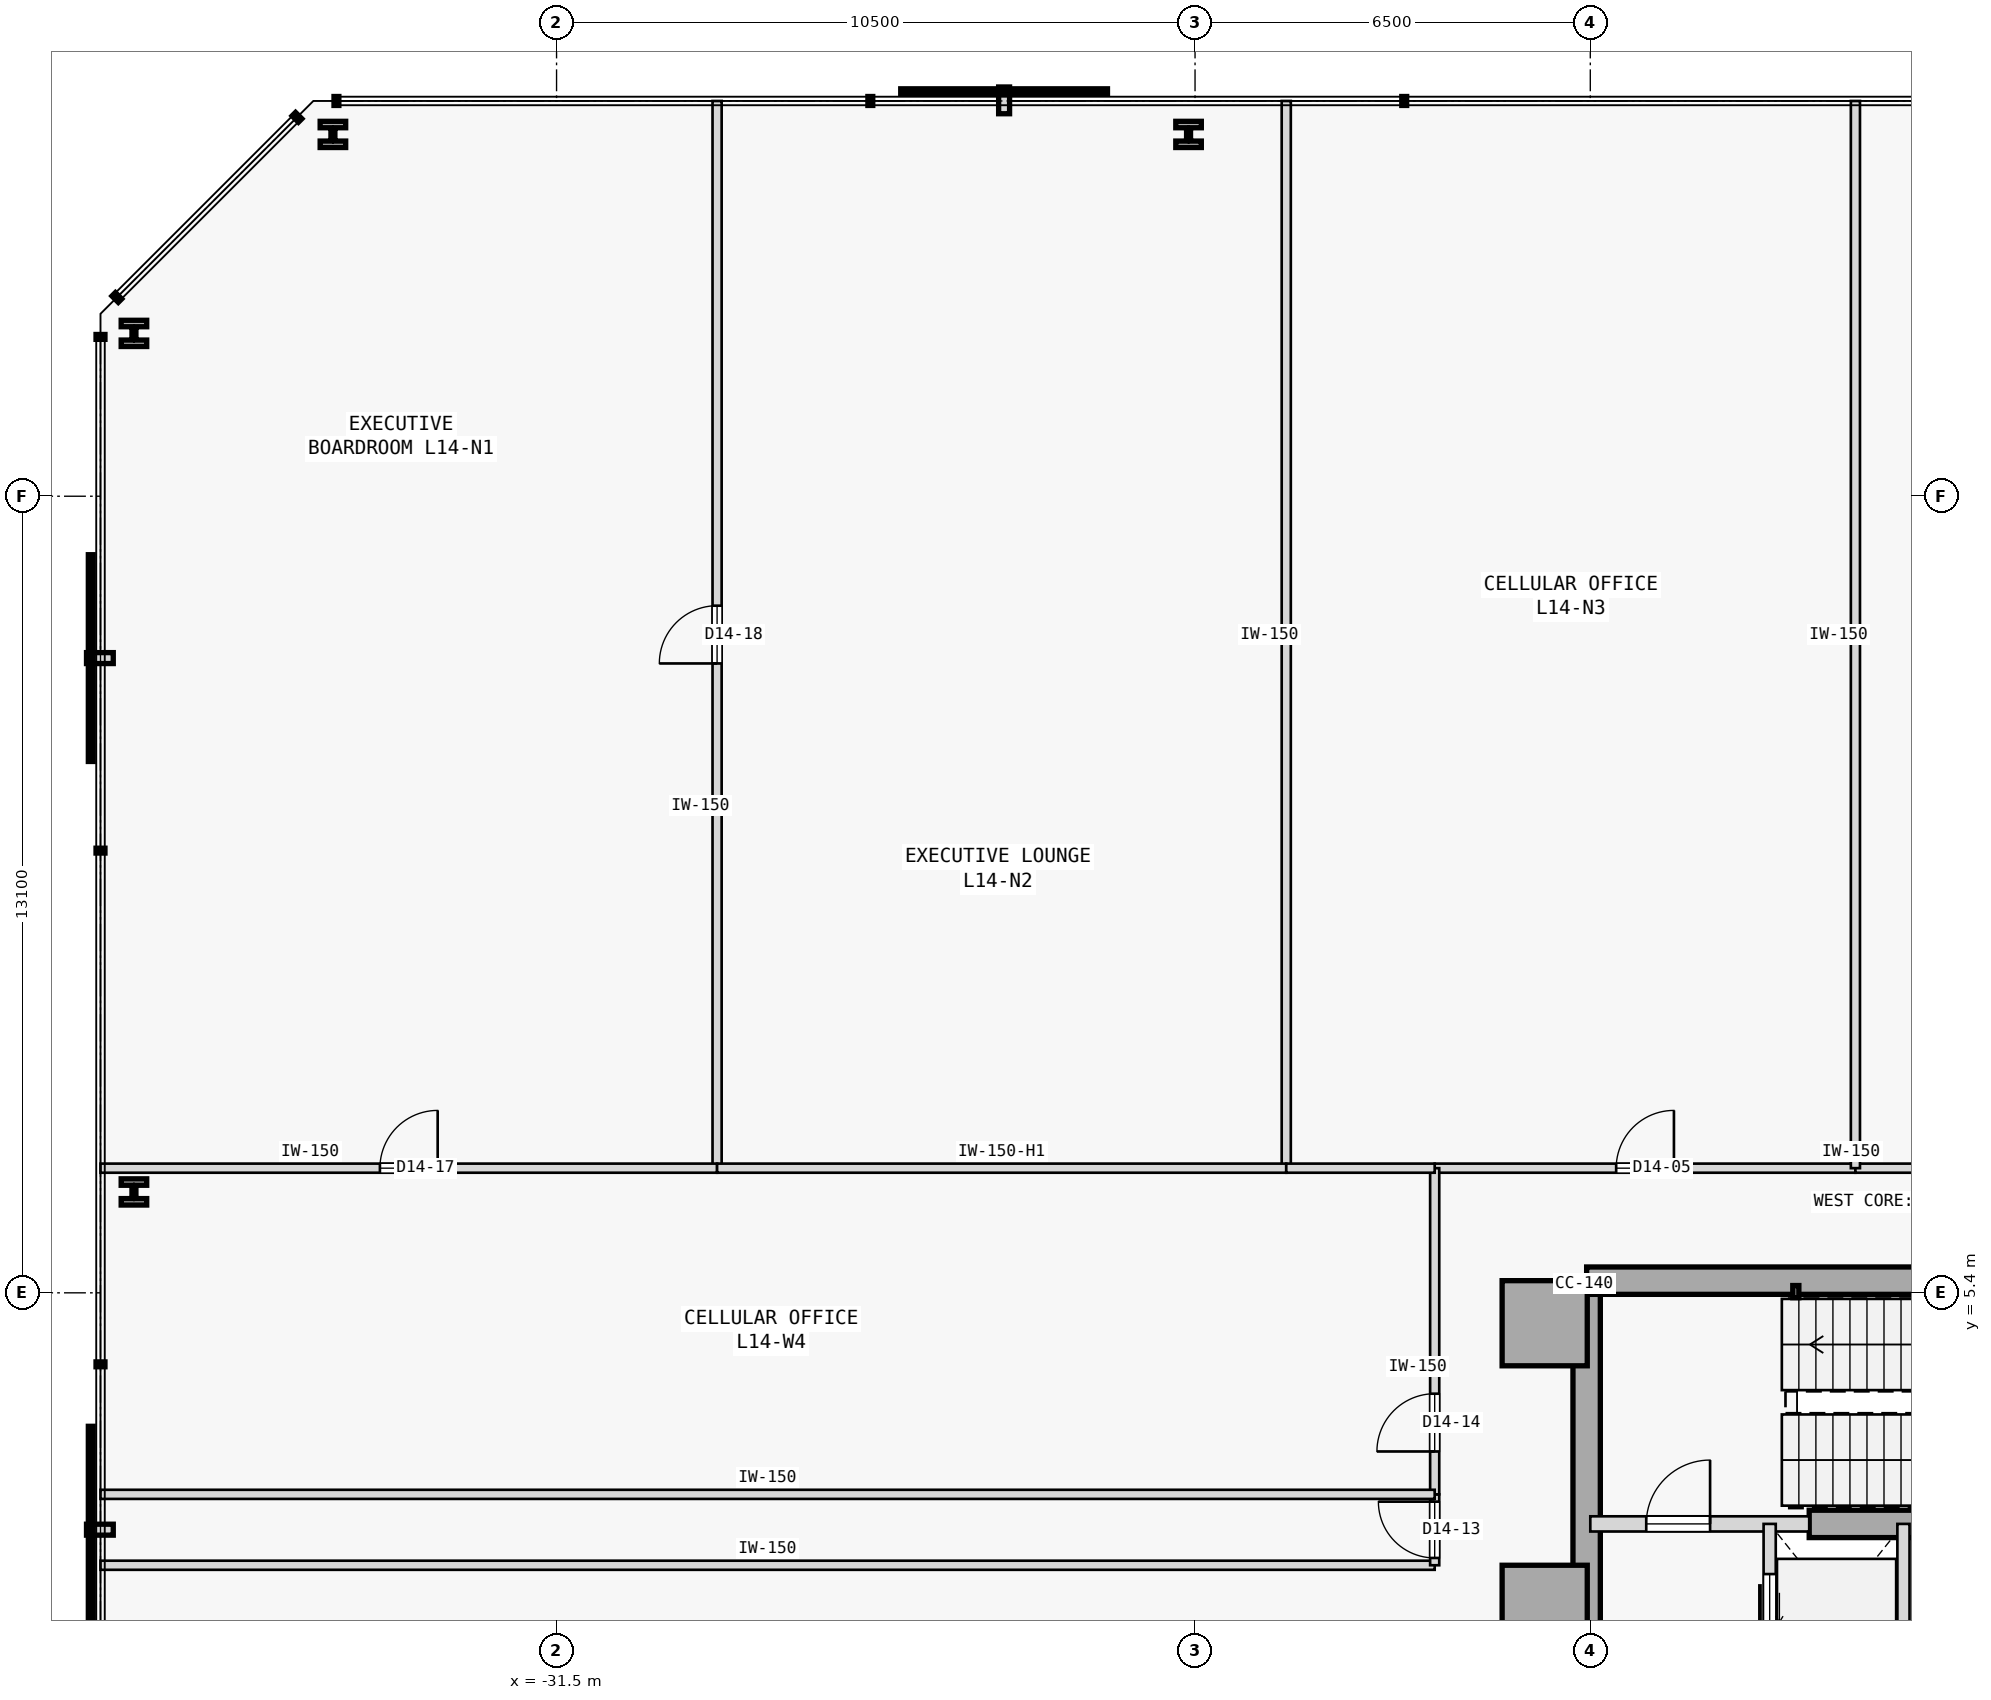
"""IFC4 building model, lengths in metres.
Left out: names, types, materials, properties, quantities, classifications, styles, units other than length and angle.
Written with IfcOpenShell. Run it as: python <this file> out.ifc"""

import sys

from ifc_helpers import new_model, si_unit, direction, frame, frame_2d, origin, origin_2d, place, context, subcontext, project, spatial, rectangle, hollow_rectangle, i_section, extrude, element, fill, save


model = new_model("IFC4")
c1 = context("Model", 3, precision=1e-05, world=origin(), true_north=direction((0.0, 1.0)))
c2 = subcontext(c1, "Body", "Model", "MODEL_VIEW")
j1 = project(units=[si_unit("LENGTHUNIT", "METRE"), si_unit("PLANEANGLEUNIT", "RADIAN")], contexts=[c1])
p1 = place(None, origin())
s1 = spatial("IfcSite", under=j1, at=p1, CompositionType="ELEMENT")
p2 = place(p1, origin())
s2 = spatial("IfcBuilding", under=s1, at=p2, CompositionType="ELEMENT")
p3 = place(p2, frame((0.0, 0.0, 59.8)))
s3 = spatial("IfcBuildingStorey", under=s2, at=p3, CompositionType="ELEMENT", Elevation=59.8)
for number, where, z_axis, x_axis in (
    (1, (-15.25, 4.9, 0.0), (0.0, 0.0, 1.0), (1.0, 0.0, 0.0)),
    (2, (-15.25, 0.22, 0.0), (0.0, 0.0, 1.0), (1.0, 0.0, 0.0)),
):
    element("IfcColumn", number, at=place(p3, frame(where, z_axis=z_axis, x_axis=x_axis)), inside=s3, PredefinedType="COLUMN", context=c2, shape_type="SweptSolid", body=[
        extrude(rectangle(XDim=1.4, YDim=1.4, at=origin_2d()), origin(), (0.0, 0.0, 1.0), 3.8),
    ])
p4 = place(p3, frame((-14.56, 5.6, 0.0), z_axis=(0.0, 0.0, 1.0), x_axis=(1.0, 0.0, 0.0)))
e3 = element("IfcWall", 3, at=p4, inside=s3, PredefinedType="SHEAR", context=c2, shape_type="SweptSolid", body=[
    extrude(rectangle(XDim=11.41, YDim=0.45, at=frame_2d((5.705, 0.0))), origin(), (0.0, 0.0, 1.0), 3.575),
])
p5 = place(p3, frame((-14.56, -5.375, 0.0), z_axis=(0.0, 0.0, 1.0), x_axis=(0.0, 1.0, 0.0)))
e4 = element("IfcWall", 4, at=p5, inside=s3, PredefinedType="SHEAR", context=c2, shape_type="SweptSolid", body=[
    extrude(rectangle(XDim=10.75, YDim=0.45, at=frame_2d((5.375, 0.0))), origin(), (0.0, 0.0, 1.0), 3.575),
])
p6 = place(p3, frame((-10.9, 1.6, 0.0), z_axis=(0.0, 0.0, 1.0), x_axis=(1.0, 0.0, 0.0)))
e5 = element("IfcWall", 5, at=p6, inside=s3, PredefinedType="SHEAR", context=c2, shape_type="SweptSolid", body=[
    extrude(rectangle(XDim=5.15, YDim=0.45, at=frame_2d((2.575, 0.0))), origin(), (0.0, 0.0, 1.0), 3.575),
])
p7 = place(p3, frame((-11.12, 5.42, 0.0), z_axis=(0.0, 0.0, 1.0), x_axis=(1.0, 0.0, 0.0)))
e6 = element("IfcColumn", 6, at=p7, inside=s3, PredefinedType="COLUMN", context=c2, shape_type="SweptSolid", body=[
    extrude(hollow_rectangle(XDim=0.1, YDim=0.2, WallThickness=0.008, at=origin_2d()), origin(), (0.0, 0.0, 1.0), 3.8),
])
for number, where, z_axis, x_axis in (
    (7, (-21.107, 24.45, 0.0), (0.0, 0.0, 1.0), (1.0, 0.0, 0.0)),
    (8, (-35.178, 24.45, 0.0), (0.0, 0.0, 1.0), (1.0, 0.0, 0.0)),
    (9, (-38.45, 21.178, 0.0), (0.0, 0.0, 1.0), (1.0, 0.0, 0.0)),
    (10, (-38.45, 7.059, 0.0), (0.0, 0.0, 1.0), (1.0, 0.0, 0.0)),
):
    element("IfcColumn", number, at=place(p3, frame(where, z_axis=z_axis, x_axis=x_axis)), inside=s3, PredefinedType="COLUMN", context=c2, shape_type="SweptSolid", body=[
        extrude(i_section(OverallWidth=0.42, OverallDepth=0.431, WebThickness=0.065, FlangeThickness=0.106, FilletRadius=0.015, at=origin_2d()), origin(), (0.0, 0.0, 1.0), 3.8),
    ])
p8 = place(p3, frame((-14.5, 1.6, 0.0), z_axis=(0.0, 0.0, 1.0), x_axis=(1.0, 0.0, 0.0)))
e11 = element("IfcWall", 11, at=p8, inside=s3, PredefinedType="STANDARD", context=c2, shape_type="SweptSolid", body=[
    extrude(rectangle(XDim=3.6, YDim=0.25, at=frame_2d((1.8, 0.0))), origin(), (0.0, 0.0, 1.0), 3.575),
])
p9 = place(p8, frame((0.92, 0.0, 0.0)))
e12 = element("IfcOpeningElement", 12, at=p9, cuts=e11, PredefinedType="OPENING", context=c2, shape_type="SweptSolid", body=[
    extrude(rectangle(XDim=1.05, YDim=2.15, at=frame_2d((0.525, 1.075))), frame((0.0, 0.135, 0.0), z_axis=(0.0, -1.0, 0.0), x_axis=(1.0, 0.0, 0.0)), (0.0, 0.0, 1.0), 0.27),
])
p10 = place(p3, frame((-11.55, -1.15, 0.0), z_axis=(0.0, 0.0, 1.0), x_axis=(0.0, 1.0, 0.0)))
e13 = element("IfcWall", 13, at=p10, inside=s3, PredefinedType="STANDARD", context=c2, shape_type="SweptSolid", body=[
    extrude(rectangle(XDim=2.75, YDim=0.2, at=frame_2d((1.375, 0.0))), origin(), (0.0, 0.0, 1.0), 3.575),
])
p11 = place(p10, frame((0.825, 0.0, 0.0)))
e14 = element("IfcOpeningElement", 14, at=p11, cuts=e13, PredefinedType="OPENING", context=c2, shape_type="SweptSolid", body=[
    extrude(rectangle(XDim=1.1, YDim=2.15, at=frame_2d((0.55, 1.075))), frame((0.0, 0.11, 0.0), z_axis=(0.0, -1.0, 0.0), x_axis=(1.0, 0.0, 0.0)), (0.0, 0.0, 1.0), 0.22),
])
p12 = place(p3, frame((-9.35, -1.15, 0.0), z_axis=(0.0, 0.0, 1.0), x_axis=(0.0, 1.0, 0.0)))
e15 = element("IfcWall", 15, at=p12, inside=s3, PredefinedType="STANDARD", context=c2, shape_type="SweptSolid", body=[
    extrude(rectangle(XDim=2.75, YDim=0.2, at=frame_2d((1.375, 0.0))), origin(), (0.0, 0.0, 1.0), 3.575),
])
p13 = place(p3, frame((-17.059, 7.45, 0.0), z_axis=(0.0, 0.0, 1.0), x_axis=(1.0, 0.0, 0.0)))
e16 = element("IfcWall", 16, at=p13, inside=s3, PredefinedType="PARTITIONING", context=c2, shape_type="SweptSolid", body=[
    extrude(rectangle(XDim=6.919, YDim=0.15, at=frame_2d((3.459, 0.0))), origin(), (0.0, 0.0, 1.0), 3.575),
])
p14 = place(p13, frame((2.985, 0.0, 0.0)))
e17 = element("IfcOpeningElement", 17, at=p14, cuts=e16, PredefinedType="OPENING", context=c2, shape_type="SweptSolid", body=[
    extrude(rectangle(XDim=0.95, YDim=2.15, at=frame_2d((0.475, 1.075))), frame((0.0, 0.085, 0.0), z_axis=(0.0, -1.0, 0.0), x_axis=(1.0, 0.0, 0.0)), (0.0, 0.0, 1.0), 0.17),
])
p15 = place(p3, frame((-10.14, 7.45, 0.0), z_axis=(0.0, 0.0, 1.0), x_axis=(1.0, 0.0, 0.0)))
e18 = element("IfcWall", 18, at=p15, inside=s3, PredefinedType="PARTITIONING", context=c2, shape_type="SweptSolid", body=[
    extrude(rectangle(XDim=9.22, YDim=0.15, at=frame_2d((4.61, 0.0))), origin(), (0.0, 0.0, 1.0), 3.575),
])
p16 = place(p3, frame((-39.0, 0.92, 0.0), z_axis=(0.0, 0.0, 1.0), x_axis=(1.0, 0.0, 0.0)))
e19 = element("IfcWall", 19, at=p16, inside=s3, PredefinedType="PARTITIONING", context=c2, shape_type="SweptSolid", body=[
    extrude(rectangle(XDim=21.941, YDim=0.15, at=frame_2d((10.97, 0.0))), origin(), (0.0, 0.0, 1.0), 3.575),
])
p17 = place(p3, frame((-17.059, 0.92, 0.0), z_axis=(0.0, 0.0, 1.0), x_axis=(0.0, 1.0, 0.0)))
e20 = element("IfcWall", 20, at=p17, inside=s3, PredefinedType="PARTITIONING", context=c2, shape_type="SweptSolid", body=[
    extrude(rectangle(XDim=1.166, YDim=0.15, at=frame_2d((0.583, 0.0))), origin(), (0.0, 0.0, 1.0), 3.575),
])
p18 = place(p17, frame((0.12, 0.0, 0.0)))
e21 = element("IfcOpeningElement", 21, at=p18, cuts=e20, PredefinedType="OPENING", context=c2, shape_type="SweptSolid", body=[
    extrude(rectangle(XDim=0.926, YDim=2.15, at=frame_2d((0.463, 1.075))), frame((0.0, 0.085, 0.0), z_axis=(0.0, -1.0, 0.0), x_axis=(1.0, 0.0, 0.0)), (0.0, 0.0, 1.0), 0.17),
])
p19 = place(p3, frame((-17.059, 2.086, 0.0), z_axis=(0.0, 0.0, 1.0), x_axis=(0.0, 1.0, 0.0)))
e22 = element("IfcWall", 22, at=p19, inside=s3, PredefinedType="PARTITIONING", context=c2, shape_type="SweptSolid", body=[
    extrude(rectangle(XDim=5.364, YDim=0.15, at=frame_2d((2.682, 0.0))), origin(), (0.0, 0.0, 1.0), 3.575),
])
p20 = place(p19, frame((0.705, 0.0, 0.0)))
e23 = element("IfcOpeningElement", 23, at=p20, cuts=e22, PredefinedType="OPENING", context=c2, shape_type="SweptSolid", body=[
    extrude(rectangle(XDim=0.95, YDim=2.15, at=frame_2d((0.475, 1.075))), frame((0.0, 0.085, 0.0), z_axis=(0.0, -1.0, 0.0), x_axis=(1.0, 0.0, 0.0)), (0.0, 0.0, 1.0), 0.17),
])
p21 = place(p3, frame((-28.86, 7.45, 0.0), z_axis=(0.0, 0.0, 1.0), x_axis=(0.0, 1.0, 0.0)))
e24 = element("IfcWall", 24, at=p21, inside=s3, PredefinedType="PARTITIONING", context=c2, shape_type="SweptSolid", body=[
    extrude(rectangle(XDim=17.55, YDim=0.15, at=frame_2d((8.775, 0.0))), origin(), (0.0, 0.0, 1.0), 3.575),
])
p22 = place(p21, frame((8.3, 0.0, 0.0)))
e25 = element("IfcOpeningElement", 25, at=p22, cuts=e24, PredefinedType="OPENING", context=c2, shape_type="SweptSolid", body=[
    extrude(rectangle(XDim=0.95, YDim=2.15, at=frame_2d((0.475, 1.075))), frame((0.0, 0.085, 0.0), z_axis=(0.0, -1.0, 0.0), x_axis=(1.0, 0.0, 0.0)), (0.0, 0.0, 1.0), 0.17),
])
p23 = place(p3, frame((-39.0, 7.45, 0.0), z_axis=(0.0, 0.0, 1.0), x_axis=(1.0, 0.0, 0.0)))
e26 = element("IfcWall", 26, at=p23, inside=s3, PredefinedType="PARTITIONING", context=c2, shape_type="SweptSolid", body=[
    extrude(rectangle(XDim=10.14, YDim=0.15, at=frame_2d((5.07, 0.0))), origin(), (0.0, 0.0, 1.0), 3.575),
])
p24 = place(p23, frame((4.595, 0.0, 0.0)))
e27 = element("IfcOpeningElement", 27, at=p24, cuts=e26, PredefinedType="OPENING", context=c2, shape_type="SweptSolid", body=[
    extrude(rectangle(XDim=0.95, YDim=2.15, at=frame_2d((0.475, 1.075))), frame((0.0, 0.085, 0.0), z_axis=(0.0, -1.0, 0.0), x_axis=(1.0, 0.0, 0.0)), (0.0, 0.0, 1.0), 0.17),
])
p25 = place(p3, frame((-19.5, 7.45, 0.0), z_axis=(0.0, 0.0, 1.0), x_axis=(0.0, 1.0, 0.0)))
e28 = element("IfcWall", 28, at=p25, inside=s3, PredefinedType="PARTITIONING", context=c2, shape_type="SweptSolid", body=[
    extrude(rectangle(XDim=17.55, YDim=0.15, at=frame_2d((8.775, 0.0))), origin(), (0.0, 0.0, 1.0), 3.575),
])
p26 = place(p3, frame((-28.86, 7.45, 0.0), z_axis=(0.0, 0.0, 1.0), x_axis=(1.0, 0.0, 0.0)))
e29 = element("IfcWall", 29, at=p26, inside=s3, PredefinedType="PARTITIONING", context=c2, shape_type="SweptSolid", body=[
    extrude(rectangle(XDim=9.36, YDim=0.15, at=frame_2d((4.68, 0.0))), origin(), (0.0, 0.0, 1.0), 3.125),
])
p27 = place(p3, frame((-10.14, 7.45, 0.0), z_axis=(0.0, 0.0, 1.0), x_axis=(0.0, 1.0, 0.0)))
e30 = element("IfcWall", 30, at=p27, inside=s3, PredefinedType="PARTITIONING", context=c2, shape_type="SweptSolid", body=[
    extrude(rectangle(XDim=17.55, YDim=0.15, at=frame_2d((8.775, 0.0))), origin(), (0.0, 0.0, 1.0), 3.575),
])
p28 = place(p3, frame((-19.5, 7.45, 0.0), z_axis=(0.0, 0.0, 1.0), x_axis=(1.0, 0.0, 0.0)))
e31 = element("IfcWall", 31, at=p28, inside=s3, PredefinedType="PARTITIONING", context=c2, shape_type="SweptSolid", body=[
    extrude(rectangle(XDim=2.441, YDim=0.15, at=frame_2d((1.22, 0.0))), origin(), (0.0, 0.0, 1.0), 3.575),
])
p29 = place(p3, frame((-39.0, 2.086, 0.0), z_axis=(0.0, 0.0, 1.0), x_axis=(1.0, 0.0, 0.0)))
e32 = element("IfcWall", 32, at=p29, inside=s3, PredefinedType="PARTITIONING", context=c2, shape_type="SweptSolid", body=[
    extrude(rectangle(XDim=21.941, YDim=0.15, at=frame_2d((10.97, 0.0))), origin(), (0.0, 0.0, 1.0), 3.575),
])
p30 = place(p9, origin())
e33 = element("IfcDoor", 33, at=p30, inside=s3, OperationType="SINGLE_SWING_RIGHT", PredefinedType="DOOR", context=c2, shape_type="SweptSolid", body=[
    extrude(rectangle(XDim=1.05, YDim=2.15, at=frame_2d((0.525, 1.075))), frame((0.0, 0.025, 0.0), z_axis=(0.0, -1.0, 0.0), x_axis=(1.0, 0.0, 0.0)), (0.0, 0.0, 1.0), 0.05),
])
fill(e12, e33)
p31 = place(p11, origin())
e34 = element("IfcDoor", 34, at=p31, inside=s3, OperationType="SLIDING_TO_RIGHT", PredefinedType="DOOR", context=c2, shape_type="SweptSolid", body=[
    extrude(rectangle(XDim=1.1, YDim=2.15, at=frame_2d((0.55, 1.075))), frame((0.0, 0.025, 0.0), z_axis=(0.0, -1.0, 0.0), x_axis=(1.0, 0.0, 0.0)), (0.0, 0.0, 1.0), 0.05),
])
fill(e14, e34)
p32 = place(p14, origin())
e35 = element("IfcDoor", 35, at=p32, inside=s3, OperationType="SINGLE_SWING_RIGHT", PredefinedType="DOOR", context=c2, shape_type="SweptSolid", body=[
    extrude(rectangle(XDim=0.95, YDim=2.15, at=frame_2d((0.475, 1.075))), frame((0.0, 0.025, 0.0), z_axis=(0.0, -1.0, 0.0), x_axis=(1.0, 0.0, 0.0)), (0.0, 0.0, 1.0), 0.05),
])
fill(e17, e35)
p33 = place(p18, origin())
e36 = element("IfcDoor", 36, at=p33, inside=s3, OperationType="SINGLE_SWING_RIGHT", PredefinedType="DOOR", context=c2, shape_type="SweptSolid", body=[
    extrude(rectangle(XDim=0.926, YDim=2.15, at=frame_2d((0.463, 1.075))), frame((0.0, 0.025, 0.0), z_axis=(0.0, -1.0, 0.0), x_axis=(1.0, 0.0, 0.0)), (0.0, 0.0, 1.0), 0.05),
])
fill(e21, e36)
p34 = place(p20, origin())
e37 = element("IfcDoor", 37, at=p34, inside=s3, OperationType="SINGLE_SWING_LEFT", PredefinedType="DOOR", context=c2, shape_type="SweptSolid", body=[
    extrude(rectangle(XDim=0.95, YDim=2.15, at=frame_2d((0.475, 1.075))), frame((0.0, 0.025, 0.0), z_axis=(0.0, -1.0, 0.0), x_axis=(1.0, 0.0, 0.0)), (0.0, 0.0, 1.0), 0.05),
])
fill(e23, e37)
p35 = place(p24, origin())
e38 = element("IfcDoor", 38, at=p35, inside=s3, OperationType="SINGLE_SWING_RIGHT", PredefinedType="DOOR", context=c2, shape_type="SweptSolid", body=[
    extrude(rectangle(XDim=0.95, YDim=2.15, at=frame_2d((0.475, 1.075))), frame((0.0, 0.025, 0.0), z_axis=(0.0, -1.0, 0.0), x_axis=(1.0, 0.0, 0.0)), (0.0, 0.0, 1.0), 0.05),
])
fill(e27, e38)
p36 = place(p22, origin())
e39 = element("IfcDoor", 39, at=p36, inside=s3, OperationType="SINGLE_SWING_LEFT", PredefinedType="DOOR", context=c2, shape_type="SweptSolid", body=[
    extrude(rectangle(XDim=0.95, YDim=2.15, at=frame_2d((0.475, 1.075))), frame((0.0, 0.025, 0.0), z_axis=(0.0, -1.0, 0.0), x_axis=(1.0, 0.0, 0.0)), (0.0, 0.0, 1.0), 0.05),
])
fill(e25, e39)
save(model, sys.argv[1])
